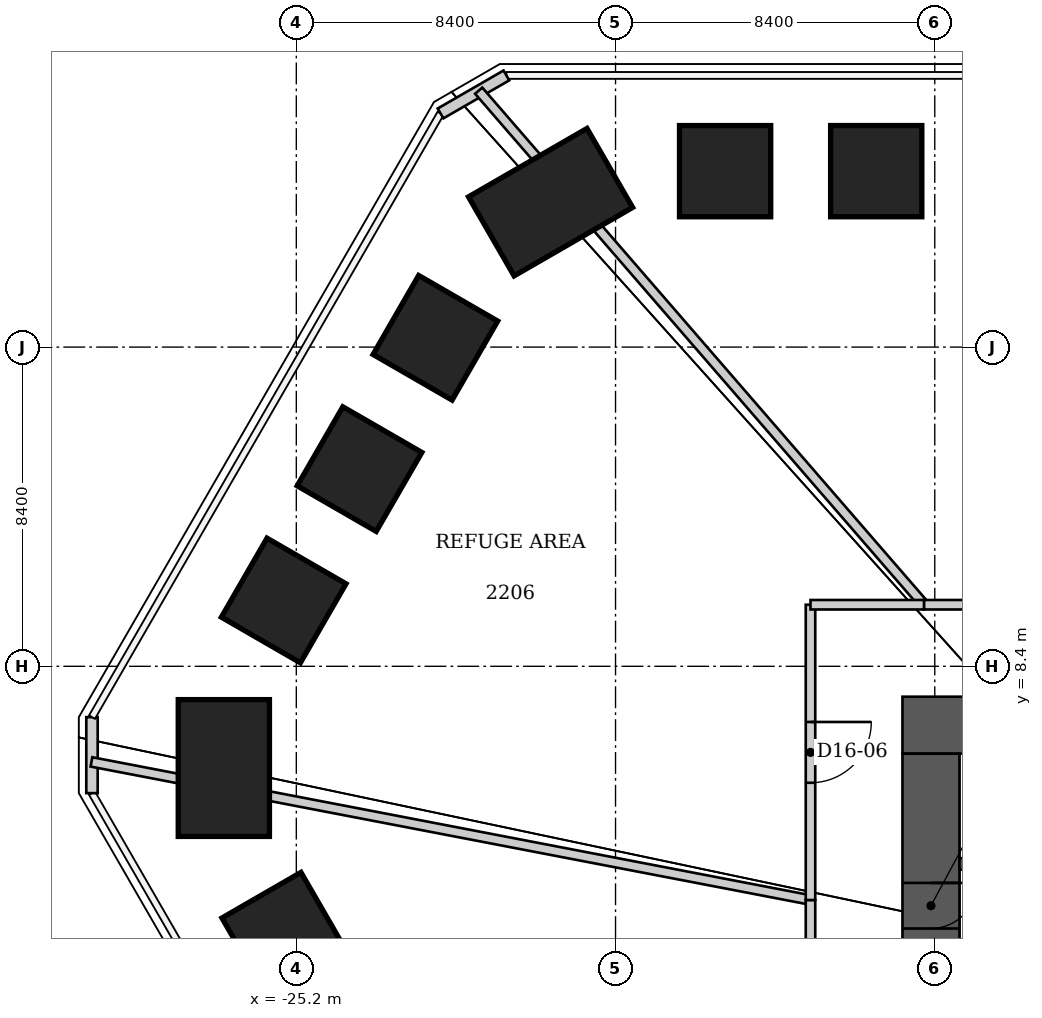
"""IFC4 building model, lengths in metres.
Left out: names, types, materials, properties, quantities, classifications, styles, units other than length and angle.
Written with IfcOpenShell. Run it as: python <this file> out.ifc"""

import sys

from ifc_helpers import new_model, si_unit, direction, frame, frame_2d, origin, origin_2d, place, context, subcontext, project, spatial, rectangle, extrude, element, fill, save


model = new_model("IFC4")
c1 = context("Model", 3, precision=1e-05, world=origin(), true_north=direction((0.0, 1.0)))
c2 = subcontext(c1, "Body", "Model", "MODEL_VIEW")
j1 = project(units=[si_unit("LENGTHUNIT", "METRE"), si_unit("PLANEANGLEUNIT", "RADIAN")], contexts=[c1])
p1 = place(None, origin())
s1 = spatial("IfcSite", under=j1, at=p1, CompositionType="ELEMENT")
p2 = place(p1, origin())
s2 = spatial("IfcBuilding", under=s1, at=p2, CompositionType="ELEMENT")
p3 = place(p2, frame((0.0, 0.0, 91.4)))
s3 = spatial("IfcBuildingStorey", under=s2, at=p3, CompositionType="ELEMENT", Elevation=91.4)
p4 = place(p3, frame((-13.917, 21.429, 0.0), z_axis=(0.023853224026, -0.036672615058, 0.999042613209), x_axis=(0.000167266676, 0.999327082748, 0.036679063624)))
e1 = element("IfcColumn", 1, at=p4, inside=s3, PredefinedType="COLUMN", context=c2, shape_type="SweptSolid", body=[
    extrude(rectangle(XDim=2.4, YDim=2.4, at=origin_2d()), origin(), (0.0, 0.0, 1.0), 5.333),
])
p5 = place(p3, frame((-9.941, 21.43, 0.0), z_axis=(0.017053044126, -0.036712049419, 0.999180373663), x_axis=(0.000107778758, 0.999325751027, 0.036715551434)))
e2 = element("IfcColumn", 2, at=p5, inside=s3, PredefinedType="COLUMN", context=c2, shape_type="SweptSolid", body=[
    extrude(rectangle(XDim=2.4, YDim=2.4, at=origin_2d()), origin(), (0.0, 0.0, 1.0), 5.34),
])
p6 = place(p3, frame((-25.517, 1.338, 0.0), z_axis=(0.043723212167, -0.002289173412, 0.999041060419), x_axis=(-0.864969947422, -0.500479225702, 0.036708782297)))
e3 = element("IfcColumn", 3, at=p6, inside=s3, PredefinedType="COLUMN", context=c2, shape_type="SweptSolid", body=[
    extrude(rectangle(XDim=2.4, YDim=2.4, at=origin_2d()), origin(), (0.0, 0.0, 1.0), 5.333),
])
p7 = place(p3, frame((-27.107, 5.723, 0.0), z_axis=(0.046838428315, -0.009889638823, 0.998853521132), x_axis=(-0.99890247848, -0.000452744235, 0.046836241416)))
e4 = element("IfcColumn", 4, at=p7, inside=s3, PredefinedType="COLUMN", context=c2, shape_type="SweptSolid", body=[
    extrude(rectangle(XDim=2.4, YDim=3.6, at=origin_2d()), origin(), (0.0, 0.0, 1.0), 5.332),
])
p8 = place(p3, frame((-25.532, 10.132, 0.0), z_axis=(0.043137386798, -0.017090447735, 0.998922961222), x_axis=(-0.865241244978, 0.499249655961, 0.045906089048)))
e5 = element("IfcColumn", 5, at=p8, inside=s3, PredefinedType="COLUMN", context=c2, shape_type="SweptSolid", body=[
    extrude(rectangle(XDim=2.4, YDim=2.4, at=origin_2d()), origin(), (0.0, 0.0, 1.0), 5.343),
])
p9 = place(p3, frame((-23.537, 13.589, 0.0), z_axis=(0.039742486504, -0.022951171885, 0.998946334132), x_axis=(-0.86505788595, 0.499568446192, 0.045893589143)))
e6 = element("IfcColumn", 6, at=p9, inside=s3, PredefinedType="COLUMN", context=c2, shape_type="SweptSolid", body=[
    extrude(rectangle(XDim=2.4, YDim=2.4, at=origin_2d()), origin(), (0.0, 0.0, 1.0), 5.351),
])
p10 = place(p3, frame((-21.541, 17.045, 0.0), z_axis=(0.036328704694, -0.028788784852, 0.998925137877), x_axis=(-0.864915731471, 0.499817631807, 0.045859703319)))
e7 = element("IfcColumn", 7, at=p10, inside=s3, PredefinedType="COLUMN", context=c2, shape_type="SweptSolid", body=[
    extrude(rectangle(XDim=2.4, YDim=2.4, at=origin_2d()), origin(), (0.0, 0.0, 1.0), 5.343),
])
p11 = place(p3, frame((-18.51, 20.614, 0.0), z_axis=(0.031958260151, -0.035575312517, 0.998855878867), x_axis=(-0.499237083594, 0.865201253746, 0.046788084823)))
e8 = element("IfcColumn", 8, at=p11, inside=s3, PredefinedType="COLUMN", context=c2, shape_type="SweptSolid", body=[
    extrude(rectangle(XDim=2.4, YDim=3.6, at=origin_2d()), origin(), (0.0, 0.0, 1.0), 5.332),
])
p12 = place(p3, frame((-9.25, 6.85, 0.0), z_axis=(0.0, 0.0, 1.0), x_axis=(1.0, 0.0, 0.0)))
e9 = element("IfcWall", 9, at=p12, inside=s3, PredefinedType="SHEAR", context=c2, shape_type="SweptSolid", body=[
    extrude(rectangle(XDim=18.5, YDim=1.5, at=frame_2d((9.25, 0.0))), origin(), (0.0, 0.0, 1.0), 5.4),
])
p13 = place(p3, frame((-8.5, -9.2, 0.0), z_axis=(0.0, 0.0, 1.0), x_axis=(0.0, 1.0, 0.0)))
e10 = element("IfcWall", 10, at=p13, inside=s3, PredefinedType="SHEAR", context=c2, shape_type="SweptSolid", body=[
    extrude(rectangle(XDim=15.3, YDim=1.5, at=frame_2d((7.65, 0.0))), origin(), (0.0, 0.0, 1.0), 5.4),
])
p14 = place(p13, frame((10.7, 0.0, 0.0)))
e11 = element("IfcOpeningElement", 11, at=p14, cuts=e10, PredefinedType="OPENING", context=c2, shape_type="SweptSolid", body=[
    extrude(rectangle(XDim=1.2, YDim=2.2, at=frame_2d((0.6, 1.1))), frame((0.0, 0.75, 0.0), z_axis=(0.0, -1.0, 0.0), x_axis=(1.0, 0.0, 0.0)), (0.0, 0.0, 1.0), 1.5),
])
p15 = place(p3, frame((-7.75, 3.2, 0.0), z_axis=(0.0, 0.0, 1.0), x_axis=(1.0, 0.0, 0.0)))
e12 = element("IfcWall", 12, at=p15, inside=s3, PredefinedType="SHEAR", context=c2, shape_type="SweptSolid", body=[
    extrude(rectangle(XDim=15.5, YDim=0.3, at=frame_2d((7.75, 0.0))), origin(), (0.0, 0.0, 1.0), 5.4),
])
p16 = place(p15, frame((6.569, 0.0, 0.0)))
e13 = element("IfcOpeningElement", 13, at=p16, cuts=e12, PredefinedType="OPENING", context=c2, shape_type="SweptSolid", body=[
    extrude(rectangle(XDim=1.1, YDim=2.2, at=frame_2d((0.55, 1.1))), frame((0.0, 0.15, 0.0), z_axis=(0.0, -1.0, 0.0), x_axis=(1.0, 0.0, 0.0)), (0.0, 0.0, 1.0), 0.3),
])
p17 = place(p15, frame((10.456, 0.0, 0.0)))
e14 = element("IfcOpeningElement", 14, at=p17, cuts=e12, PredefinedType="OPENING", context=c2, shape_type="SweptSolid", body=[
    extrude(rectangle(XDim=1.1, YDim=2.2, at=frame_2d((0.55, 1.1))), frame((0.0, 0.15, 0.0), z_axis=(0.0, -1.0, 0.0), x_axis=(1.0, 0.0, 0.0)), (0.0, 0.0, 1.0), 0.3),
])
p18 = place(p15, frame((13.762, 0.0, 0.0)))
e15 = element("IfcOpeningElement", 15, at=p18, cuts=e12, PredefinedType="OPENING", context=c2, shape_type="SweptSolid", body=[
    extrude(rectangle(XDim=1.1, YDim=2.2, at=frame_2d((0.55, 1.1))), frame((0.0, 0.15, 0.0), z_axis=(0.0, -1.0, 0.0), x_axis=(1.0, 0.0, 0.0)), (0.0, 0.0, 1.0), 0.3),
])
for number, where, z_axis, x_axis in (
    (16, (-30.576, 5.062, 0.0), (0.0, 0.0, 1.0), (0.0, 1.0, 0.0)),
    (17, (-21.404, 22.949, 0.0), (0.0, 0.0, 1.0), (0.866, 0.5, 0.0)),
):
    element("IfcWall", number, at=place(p3, frame(where, z_axis=z_axis, x_axis=x_axis)), inside=s3, PredefinedType="SOLIDWALL", context=c2, shape_type="SweptSolid", body=[
        extrude(rectangle(XDim=2.0, YDim=0.3, at=frame_2d((1.0, 0.0))), origin(), (0.0, 0.0, 1.0), 5.24),
    ])
p19 = place(p3, frame((-30.591, 5.884, 0.0), z_axis=(0.0, 0.0, 1.0), x_axis=(0.982047909255, -0.188631662049, 0.0)))
e18 = element("IfcWall", 18, at=p19, inside=s3, PredefinedType="PARTITIONING", context=c2, shape_type="SweptSolid", body=[
    extrude(rectangle(XDim=19.267, YDim=0.25, at=frame_2d((9.633, 0.0))), origin(), (0.0, 0.0, 1.0), 4.275),
])
p20 = place(p3, frame((-11.67, 2.25, 0.0), z_axis=(0.0, 0.0, 1.0), x_axis=(0.0, -1.0, 0.0)))
e19 = element("IfcWall", 19, at=p20, inside=s3, PredefinedType="PARTITIONING", context=c2, shape_type="SweptSolid", body=[
    extrude(rectangle(XDim=15.37, YDim=0.25, at=frame_2d((7.685, 0.0))), origin(), (0.0, 0.0, 1.0), 5.24),
])
p21 = place(p20, frame((6.885, 0.0, 0.0)))
e20 = element("IfcOpeningElement", 20, at=p21, cuts=e19, PredefinedType="OPENING", context=c2, shape_type="SweptSolid", body=[
    extrude(rectangle(XDim=1.6, YDim=2.4, at=frame_2d((0.8, 1.2))), frame((0.0, 0.125, 0.0), z_axis=(0.0, -1.0, 0.0), x_axis=(1.0, 0.0, 0.0)), (0.0, 0.0, 1.0), 0.25),
])
p22 = place(p3, frame((-11.67, 10.02, 0.0), z_axis=(0.0, 0.0, 1.0), x_axis=(0.0, -1.0, 0.0)))
e21 = element("IfcWall", 21, at=p22, inside=s3, PredefinedType="PARTITIONING", context=c2, shape_type="SweptSolid", body=[
    extrude(rectangle(XDim=7.77, YDim=0.25, at=frame_2d((3.885, 0.0))), origin(), (0.0, 0.0, 1.0), 5.24),
])
p23 = place(p22, frame((3.085, 0.0, 0.0)))
e22 = element("IfcOpeningElement", 22, at=p23, cuts=e21, PredefinedType="OPENING", context=c2, shape_type="SweptSolid", body=[
    extrude(rectangle(XDim=1.6, YDim=2.4, at=frame_2d((0.8, 1.2))), frame((0.0, 0.125, 0.0), z_axis=(0.0, -1.0, 0.0), x_axis=(1.0, 0.0, 0.0)), (0.0, 0.0, 1.0), 0.25),
])
p24 = place(p3, frame((-8.68, 10.02, 0.0), z_axis=(0.0, 0.0, 1.0), x_axis=(-0.654827191867, 0.755778637427, 0.0)))
e23 = element("IfcWall", 23, at=p24, inside=s3, PredefinedType="PARTITIONING", context=c2, shape_type="SweptSolid", body=[
    extrude(rectangle(XDim=17.898, YDim=0.25, at=frame_2d((8.949, 0.0))), origin(), (0.0, 0.0, 1.0), 5.2),
])
p25 = place(p3, frame((-8.68, 10.02, 0.0), z_axis=(0.0, 0.0, 1.0), x_axis=(-1.0, 0.0, 0.0)))
e24 = element("IfcWall", 24, at=p25, inside=s3, PredefinedType="PARTITIONING", context=c2, shape_type="SweptSolid", body=[
    extrude(rectangle(XDim=2.99, YDim=0.25, at=frame_2d((1.495, 0.0))), origin(), (0.0, 0.0, 1.0), 5.24),
])
p26 = place(p3, frame((8.68, 10.02, 0.0), z_axis=(0.0, 0.0, 1.0), x_axis=(-1.0, 0.0, 0.0)))
e25 = element("IfcWall", 25, at=p26, inside=s3, PredefinedType="PARTITIONING", context=c2, shape_type="SweptSolid", body=[
    extrude(rectangle(XDim=17.36, YDim=0.25, at=frame_2d((8.68, 0.0))), origin(), (0.0, 0.0, 1.0), 5.24),
])
p27 = place(p26, frame((7.88, 0.0, 0.0)))
e26 = element("IfcOpeningElement", 26, at=p27, cuts=e25, PredefinedType="OPENING", context=c2, shape_type="SweptSolid", body=[
    extrude(rectangle(XDim=1.6, YDim=2.4, at=frame_2d((0.8, 1.2))), frame((0.0, 0.125, 0.0), z_axis=(0.0, -1.0, 0.0), x_axis=(1.0, 0.0, 0.0)), (0.0, 0.0, 1.0), 0.25),
])
p28 = place(p23, origin())
e27 = element("IfcDoor", 27, at=p28, inside=s3, OperationType="DOUBLE_DOOR_SINGLE_SWING", PredefinedType="DOOR", context=c2, shape_type="SweptSolid", body=[
    extrude(rectangle(XDim=1.6, YDim=2.4, at=frame_2d((0.8, 1.2))), frame((0.0, 0.025, 0.0), z_axis=(0.0, -1.0, 0.0), x_axis=(1.0, 0.0, 0.0)), (0.0, 0.0, 1.0), 0.05),
])
fill(e22, e27)
p29 = place(p14, origin())
e28 = element("IfcDoor", 28, at=p29, inside=s3, OperationType="SINGLE_SWING_RIGHT", PredefinedType="DOOR", context=c2, shape_type="SweptSolid", body=[
    extrude(rectangle(XDim=1.2, YDim=2.2, at=frame_2d((0.6, 1.1))), frame((0.0, 0.025, 0.0), z_axis=(0.0, -1.0, 0.0), x_axis=(1.0, 0.0, 0.0)), (0.0, 0.0, 1.0), 0.05),
])
fill(e11, e28)
save(model, sys.argv[1])
